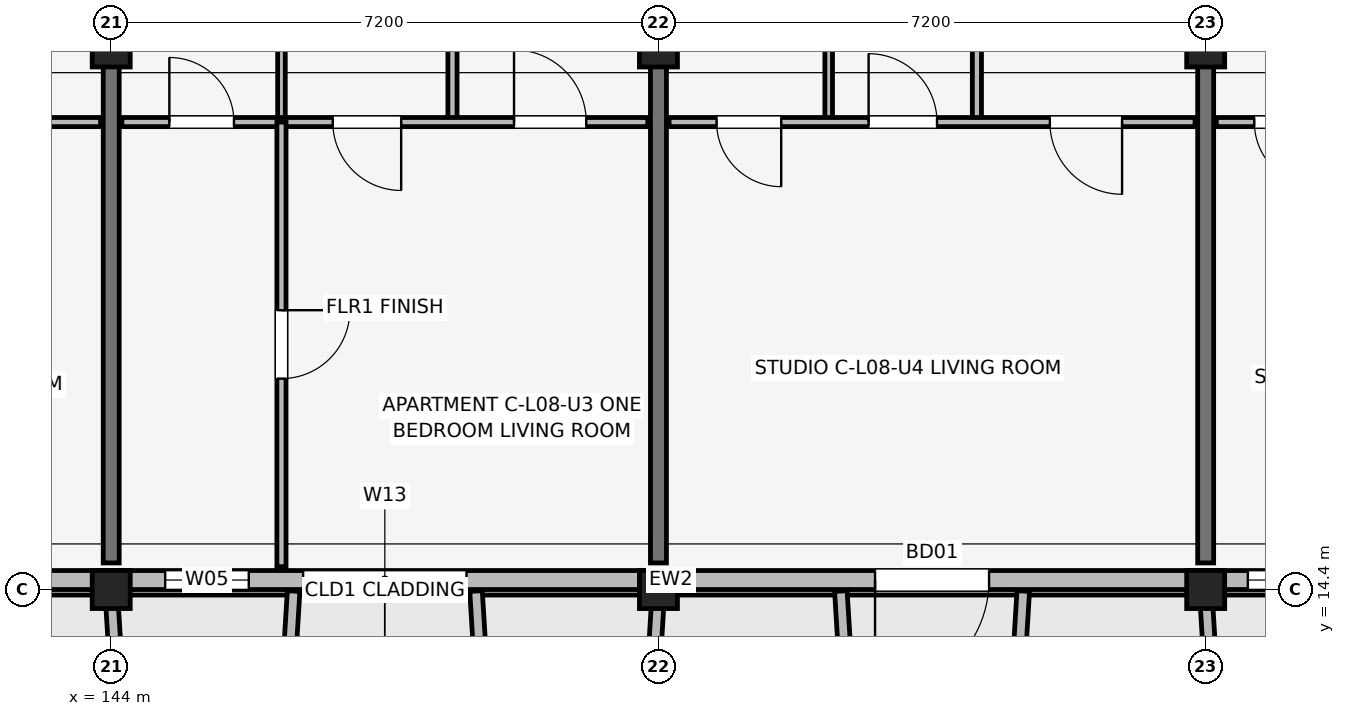
"""IFC4 building model, lengths in metres.
Left out: names, types, materials, properties, quantities, classifications, styles, units other than length and angle.
Written with IfcOpenShell. Run it as: python <this file> out.ifc"""

import sys

from ifc_helpers import new_model, si_unit, direction, frame, frame_2d, origin, origin_2d, place, context, subcontext, project, spatial, rectangle, extrude, element, fill, save


model = new_model("IFC4")
c1 = context("Model", 3, precision=1e-05, world=origin(), true_north=direction((0.0, 1.0)))
c2 = subcontext(c1, "Body", "Model", "MODEL_VIEW")
j1 = project(units=[si_unit("LENGTHUNIT", "METRE"), si_unit("PLANEANGLEUNIT", "RADIAN")], contexts=[c1])
p1 = place(None, origin())
s1 = spatial("IfcSite", under=j1, at=p1, CompositionType="ELEMENT")
p2 = place(p1, origin())
s2 = spatial("IfcBuilding", under=s1, at=p2, CompositionType="ELEMENT")
p3 = place(p2, frame((0.0, 0.0, 27.6)))
s3 = spatial("IfcBuildingStorey", under=s2, at=p3, CompositionType="ELEMENT", Elevation=27.6)
p4 = place(p3, frame((144.0, 14.4, 0.0), z_axis=(0.0, 0.0, 1.0), x_axis=(1.0, 0.0, 0.0)))
e1 = element("IfcColumn", 1, at=p4, inside=s3, PredefinedType="COLUMN", context=c2, shape_type="SweptSolid", body=[
    extrude(rectangle(XDim=0.5, YDim=0.5, at=origin_2d()), origin(), (0.0, 0.0, 1.0), 3.15),
])
p5 = place(p3, frame((144.0, 21.6, 0.0), z_axis=(0.0, 0.0, 1.0), x_axis=(1.0, 0.0, 0.0)))
e2 = element("IfcColumn", 2, at=p5, inside=s3, PredefinedType="COLUMN", context=c2, shape_type="SweptSolid", body=[
    extrude(rectangle(XDim=0.5, YDim=0.65, at=origin_2d()), origin(), (0.0, 0.0, 1.0), 3.15),
])
p6 = place(p3, frame((151.2, 14.4, 0.0), z_axis=(0.0, 0.0, 1.0), x_axis=(1.0, 0.0, 0.0)))
e3 = element("IfcColumn", 3, at=p6, inside=s3, PredefinedType="COLUMN", context=c2, shape_type="SweptSolid", body=[
    extrude(rectangle(XDim=0.5, YDim=0.5, at=origin_2d()), origin(), (0.0, 0.0, 1.0), 3.15),
])
p7 = place(p3, frame((151.2, 21.6, 0.0), z_axis=(0.0, 0.0, 1.0), x_axis=(1.0, 0.0, 0.0)))
e4 = element("IfcColumn", 4, at=p7, inside=s3, PredefinedType="COLUMN", context=c2, shape_type="SweptSolid", body=[
    extrude(rectangle(XDim=0.5, YDim=0.65, at=origin_2d()), origin(), (0.0, 0.0, 1.0), 3.15),
])
p8 = place(p3, frame((158.4, 14.4, 0.0), z_axis=(0.0, 0.0, 1.0), x_axis=(1.0, 0.0, 0.0)))
e5 = element("IfcColumn", 5, at=p8, inside=s3, PredefinedType="COLUMN", context=c2, shape_type="SweptSolid", body=[
    extrude(rectangle(XDim=0.5, YDim=0.5, at=origin_2d()), origin(), (0.0, 0.0, 1.0), 3.15),
])
p9 = place(p3, frame((158.4, 21.6, 0.0), z_axis=(0.0, 0.0, 1.0), x_axis=(1.0, 0.0, 0.0)))
e6 = element("IfcColumn", 6, at=p9, inside=s3, PredefinedType="COLUMN", context=c2, shape_type="SweptSolid", body=[
    extrude(rectangle(XDim=0.5, YDim=0.65, at=origin_2d()), origin(), (0.0, 0.0, 1.0), 3.15),
])
for number, where, z_axis, x_axis in (
    (7, (144.0, 14.75, 0.0), (0.0, 0.0, 1.0), (0.0, 1.0, 0.0)),
    (8, (151.2, 14.75, 0.0), (0.0, 0.0, 1.0), (0.0, 1.0, 0.0)),
    (9, (158.4, 14.75, 0.0), (0.0, 0.0, 1.0), (0.0, 1.0, 0.0)),
):
    element("IfcWall", number, at=place(p3, frame(where, z_axis=z_axis, x_axis=x_axis)), inside=s3, PredefinedType="SHEAR", context=c2, shape_type="SweptSolid", body=[
        extrude(rectangle(XDim=9.4, YDim=0.21, at=frame_2d((4.7, 0.0))), origin(), (0.0, 0.0, 1.0), 3.15),
    ])
p10 = place(p3, frame((132.6, 14.525, 0.0), z_axis=(0.0, 0.0, 1.0), x_axis=(1.0, 0.0, 0.0)))
e10 = element("IfcWall", 10, at=p10, inside=s3, PredefinedType="SOLIDWALL", context=c2, shape_type="SweptSolid", body=[
    extrude(rectangle(XDim=30.0, YDim=0.25, at=frame_2d((15.0, 0.0))), origin(), (0.0, 0.0, 1.0), 2.43),
])
p11 = place(p10, frame((8.625, 0.0, 0.0), z_axis=(0.0, 0.0, 1.0), x_axis=(-1.0, 0.0, 0.0)))
e11 = element("IfcOpeningElement", 11, at=p11, cuts=e10, PredefinedType="OPENING", context=c2, shape_type="SweptSolid", body=[
    extrude(rectangle(XDim=1.65, YDim=2.15, at=frame_2d((0.825, 1.075))), frame((0.0, 0.135, 0.0), z_axis=(0.0, -1.0, 0.0), x_axis=(1.0, 0.0, 0.0)), (0.0, 0.0, 1.0), 0.27),
])
p12 = place(p10, frame((22.95, 0.0, 0.0), z_axis=(0.0, 0.0, 1.0), x_axis=(-1.0, 0.0, 0.0)))
e12 = element("IfcOpeningElement", 12, at=p12, cuts=e10, PredefinedType="OPENING", context=c2, shape_type="SweptSolid", body=[
    extrude(rectangle(XDim=1.5, YDim=2.15, at=frame_2d((0.75, 1.075))), frame((0.0, 0.135, 0.0), z_axis=(0.0, -1.0, 0.0), x_axis=(1.0, 0.0, 0.0)), (0.0, 0.0, 1.0), 0.27),
])
p13 = place(p10, frame((2.365, 0.0, 0.75)))
e13 = element("IfcOpeningElement", 13, at=p13, cuts=e10, PredefinedType="OPENING", context=c2, shape_type="SweptSolid", body=[
    extrude(rectangle(XDim=0.98, YDim=1.45, at=frame_2d((0.49, 0.725))), frame((0.0, 0.135, 0.0), z_axis=(0.0, -1.0, 0.0), x_axis=(1.0, 0.0, 0.0)), (0.0, 0.0, 1.0), 0.27),
])
p14 = place(p10, frame((12.11, 0.0, 0.75)))
e14 = element("IfcOpeningElement", 14, at=p14, cuts=e10, PredefinedType="OPENING", context=c2, shape_type="SweptSolid", body=[
    extrude(rectangle(XDim=1.1, YDim=1.5, at=frame_2d((0.55, 0.75))), frame((0.0, 0.135, 0.0), z_axis=(0.0, -1.0, 0.0), x_axis=(1.0, 0.0, 0.0)), (0.0, 0.0, 1.0), 0.27),
])
p15 = place(p10, frame((13.925, 0.0, 0.67)))
e15 = element("IfcOpeningElement", 15, at=p15, cuts=e10, PredefinedType="OPENING", context=c2, shape_type="SweptSolid", body=[
    extrude(rectangle(XDim=2.15, YDim=1.65, at=frame_2d((1.075, 0.825))), frame((0.0, 0.135, 0.0), z_axis=(0.0, -1.0, 0.0), x_axis=(1.0, 0.0, 0.0)), (0.0, 0.0, 1.0), 0.27),
])
p16 = place(p10, frame((26.355, 0.0, 0.7)))
e16 = element("IfcOpeningElement", 16, at=p16, cuts=e10, PredefinedType="OPENING", context=c2, shape_type="SweptSolid", body=[
    extrude(rectangle(XDim=1.58, YDim=1.6, at=frame_2d((0.79, 0.8))), frame((0.0, 0.135, 0.0), z_axis=(0.0, -1.0, 0.0), x_axis=(1.0, 0.0, 0.0)), (0.0, 0.0, 1.0), 0.27),
])
p17 = place(p3, frame((144.0, 14.38, 0.0), z_axis=(0.0, 0.0, 1.0), x_axis=(0.061170732449, -0.998127317276, 0.0)))
e17 = element("IfcWall", 17, at=p17, inside=s3, PredefinedType="ELEMENTEDWALL", context=c2, shape_type="SweptSolid", body=[
    extrude(rectangle(XDim=1.964, YDim=0.165, at=frame_2d((0.982, 0.0))), origin(), (0.0, 0.0, 1.0), 2.95),
])
for number, where, z_axis, x_axis in (
    (18, (146.4, 14.38, 0.0), (0.0, 0.0, 1.0), (-0.061, -0.998, 0.0)),
    (19, (148.8, 14.38, 0.0), (0.0, 0.0, 1.0), (0.061, -0.998, 0.0)),
):
    element("IfcWall", number, at=place(p3, frame(where, z_axis=z_axis, x_axis=x_axis)), inside=s3, PredefinedType="ELEMENTEDWALL", context=c2, shape_type="SweptSolid", body=[
        extrude(rectangle(XDim=1.964, YDim=0.165, at=frame_2d((0.982, 0.0))), origin(), (0.0, 0.0, 1.0), 2.53),
    ])
p18 = place(p3, frame((151.2, 14.38, 0.0), z_axis=(0.0, 0.0, 1.0), x_axis=(-0.061046865508, -0.998134900808, 0.0)))
e20 = element("IfcWall", 20, at=p18, inside=s3, PredefinedType="ELEMENTEDWALL", context=c2, shape_type="SweptSolid", body=[
    extrude(rectangle(XDim=1.964, YDim=0.165, at=frame_2d((0.982, 0.0))), origin(), (0.0, 0.0, 1.0), 2.95),
])
for number, where, z_axis, x_axis in (
    (21, (153.6, 14.38, 0.0), (0.0, 0.0, 1.0), (0.061, -0.998, 0.0)),
    (22, (156.0, 14.38, 0.0), (0.0, 0.0, 1.0), (-0.061, -0.998, 0.0)),
):
    element("IfcWall", number, at=place(p3, frame(where, z_axis=z_axis, x_axis=x_axis)), inside=s3, PredefinedType="ELEMENTEDWALL", context=c2, shape_type="SweptSolid", body=[
        extrude(rectangle(XDim=1.964, YDim=0.165, at=frame_2d((0.982, 0.0))), origin(), (0.0, 0.0, 1.0), 2.55),
    ])
p19 = place(p3, frame((158.4, 14.38, 0.0), z_axis=(0.0, 0.0, 1.0), x_axis=(0.061170732449, -0.998127317276, 0.0)))
e23 = element("IfcWall", 23, at=p19, inside=s3, PredefinedType="ELEMENTEDWALL", context=c2, shape_type="SweptSolid", body=[
    extrude(rectangle(XDim=1.964, YDim=0.165, at=frame_2d((0.982, 0.0))), origin(), (0.0, 0.0, 1.0), 2.95),
])
p20 = place(p3, frame((136.94, 20.55, 0.0), z_axis=(0.0, 0.0, 1.0), x_axis=(1.0, 0.0, 0.0)))
e24 = element("IfcWall", 24, at=p20, inside=s3, PredefinedType="PARTITIONING", context=c2, shape_type="SweptSolid", body=[
    extrude(rectangle(XDim=6.92, YDim=0.12, at=frame_2d((3.46, 0.0))), origin(), (0.0, 0.0, 1.0), 2.38),
])
p21 = place(p20, frame((0.625, 0.0, 0.0)))
e25 = element("IfcOpeningElement", 25, at=p21, cuts=e24, PredefinedType="OPENING", context=c2, shape_type="SweptSolid", body=[
    extrude(rectangle(XDim=0.85, YDim=2.08, at=frame_2d((0.425, 1.04))), frame((0.0, 0.07, 0.0), z_axis=(0.0, -1.0, 0.0), x_axis=(1.0, 0.0, 0.0)), (0.0, 0.0, 1.0), 0.14),
])
p22 = place(p20, frame((3.525, 0.0, 0.0), z_axis=(0.0, 0.0, 1.0), x_axis=(-1.0, 0.0, 0.0)))
e26 = element("IfcOpeningElement", 26, at=p22, cuts=e24, PredefinedType="OPENING", context=c2, shape_type="SweptSolid", body=[
    extrude(rectangle(XDim=0.9, YDim=2.08, at=frame_2d((0.45, 1.04))), frame((0.0, 0.07, 0.0), z_axis=(0.0, -1.0, 0.0), x_axis=(1.0, 0.0, 0.0)), (0.0, 0.0, 1.0), 0.14),
])
p23 = place(p20, frame((5.01, 0.0, 0.0)))
e27 = element("IfcOpeningElement", 27, at=p23, cuts=e24, PredefinedType="OPENING", context=c2, shape_type="SweptSolid", body=[
    extrude(rectangle(XDim=0.95, YDim=2.08, at=frame_2d((0.475, 1.04))), frame((0.0, 0.07, 0.0), z_axis=(0.0, -1.0, 0.0), x_axis=(1.0, 0.0, 0.0)), (0.0, 0.0, 1.0), 0.14),
])
p24 = place(p3, frame((146.24, 20.55, 0.0), z_axis=(0.0, 0.0, 1.0), x_axis=(0.0, 1.0, 0.0)))
e28 = element("IfcWall", 28, at=p24, inside=s3, PredefinedType="PARTITIONING", context=c2, shape_type="SweptSolid", body=[
    extrude(rectangle(XDim=3.75, YDim=0.1, at=frame_2d((1.875, 0.0))), origin(), (0.0, 0.0, 1.0), 2.38),
])
p25 = place(p3, frame((148.49, 20.55, 0.0), z_axis=(0.0, 0.0, 1.0), x_axis=(0.0, 1.0, 0.0)))
e29 = element("IfcWall", 29, at=p25, inside=s3, PredefinedType="PARTITIONING", context=c2, shape_type="SweptSolid", body=[
    extrude(rectangle(XDim=3.75, YDim=0.12, at=frame_2d((1.875, 0.0))), origin(), (0.0, 0.0, 1.0), 2.38),
])
p26 = place(p3, frame((144.14, 20.55, 0.0), z_axis=(0.0, 0.0, 1.0), x_axis=(1.0, 0.0, 0.0)))
e30 = element("IfcWall", 30, at=p26, inside=s3, PredefinedType="PARTITIONING", context=c2, shape_type="SweptSolid", body=[
    extrude(rectangle(XDim=6.92, YDim=0.12, at=frame_2d((3.46, 0.0))), origin(), (0.0, 0.0, 1.0), 2.38),
])
p27 = place(p26, frame((0.625, 0.0, 0.0)))
e31 = element("IfcOpeningElement", 31, at=p27, cuts=e30, PredefinedType="OPENING", context=c2, shape_type="SweptSolid", body=[
    extrude(rectangle(XDim=0.85, YDim=2.08, at=frame_2d((0.425, 1.04))), frame((0.0, 0.07, 0.0), z_axis=(0.0, -1.0, 0.0), x_axis=(1.0, 0.0, 0.0)), (0.0, 0.0, 1.0), 0.14),
])
p28 = place(p26, frame((3.675, 0.0, 0.0), z_axis=(0.0, 0.0, 1.0), x_axis=(-1.0, 0.0, 0.0)))
e32 = element("IfcOpeningElement", 32, at=p28, cuts=e30, PredefinedType="OPENING", context=c2, shape_type="SweptSolid", body=[
    extrude(rectangle(XDim=0.9, YDim=2.08, at=frame_2d((0.45, 1.04))), frame((0.0, 0.07, 0.0), z_axis=(0.0, -1.0, 0.0), x_axis=(1.0, 0.0, 0.0)), (0.0, 0.0, 1.0), 0.14),
])
p29 = place(p26, frame((5.16, 0.0, 0.0)))
e33 = element("IfcOpeningElement", 33, at=p29, cuts=e30, PredefinedType="OPENING", context=c2, shape_type="SweptSolid", body=[
    extrude(rectangle(XDim=0.95, YDim=2.08, at=frame_2d((0.475, 1.04))), frame((0.0, 0.07, 0.0), z_axis=(0.0, -1.0, 0.0), x_axis=(1.0, 0.0, 0.0)), (0.0, 0.0, 1.0), 0.14),
])
p30 = place(p3, frame((146.24, 14.7, 0.0), z_axis=(0.0, 0.0, 1.0), x_axis=(0.0, 1.0, 0.0)))
e34 = element("IfcWall", 34, at=p30, inside=s3, PredefinedType="PARTITIONING", context=c2, shape_type="SweptSolid", body=[
    extrude(rectangle(XDim=5.85, YDim=0.12, at=frame_2d((2.925, 0.0))), origin(), (0.0, 0.0, 1.0), 2.38),
])
p31 = place(p30, frame((3.375, 0.0, 0.0), z_axis=(0.0, 0.0, 1.0), x_axis=(-1.0, 0.0, 0.0)))
e35 = element("IfcOpeningElement", 35, at=p31, cuts=e34, PredefinedType="OPENING", context=c2, shape_type="SweptSolid", body=[
    extrude(rectangle(XDim=0.9, YDim=2.08, at=frame_2d((0.45, 1.04))), frame((0.0, 0.07, 0.0), z_axis=(0.0, -1.0, 0.0), x_axis=(1.0, 0.0, 0.0)), (0.0, 0.0, 1.0), 0.14),
])
p32 = place(p3, frame((153.44, 20.55, 0.0), z_axis=(0.0, 0.0, 1.0), x_axis=(0.0, 1.0, 0.0)))
e36 = element("IfcWall", 36, at=p32, inside=s3, PredefinedType="PARTITIONING", context=c2, shape_type="SweptSolid", body=[
    extrude(rectangle(XDim=3.75, YDim=0.1, at=frame_2d((1.875, 0.0))), origin(), (0.0, 0.0, 1.0), 2.38),
])
p33 = place(p3, frame((155.39, 20.55, 0.0), z_axis=(0.0, 0.0, 1.0), x_axis=(0.0, 1.0, 0.0)))
e37 = element("IfcWall", 37, at=p33, inside=s3, PredefinedType="PARTITIONING", context=c2, shape_type="SweptSolid", body=[
    extrude(rectangle(XDim=3.75, YDim=0.12, at=frame_2d((1.875, 0.0))), origin(), (0.0, 0.0, 1.0), 2.38),
])
p34 = place(p3, frame((151.34, 20.55, 0.0), z_axis=(0.0, 0.0, 1.0), x_axis=(1.0, 0.0, 0.0)))
e38 = element("IfcWall", 38, at=p34, inside=s3, PredefinedType="PARTITIONING", context=c2, shape_type="SweptSolid", body=[
    extrude(rectangle(XDim=6.92, YDim=0.12, at=frame_2d((3.46, 0.0))), origin(), (0.0, 0.0, 1.0), 2.38),
])
p35 = place(p34, frame((1.475, 0.0, 0.0), z_axis=(0.0, 0.0, 1.0), x_axis=(-1.0, 0.0, 0.0)))
e39 = element("IfcOpeningElement", 39, at=p35, cuts=e38, PredefinedType="OPENING", context=c2, shape_type="SweptSolid", body=[
    extrude(rectangle(XDim=0.85, YDim=2.08, at=frame_2d((0.425, 1.04))), frame((0.0, 0.07, 0.0), z_axis=(0.0, -1.0, 0.0), x_axis=(1.0, 0.0, 0.0)), (0.0, 0.0, 1.0), 0.14),
])
p36 = place(p34, frame((2.625, 0.0, 0.0)))
e40 = element("IfcOpeningElement", 40, at=p36, cuts=e38, PredefinedType="OPENING", context=c2, shape_type="SweptSolid", body=[
    extrude(rectangle(XDim=0.9, YDim=2.08, at=frame_2d((0.45, 1.04))), frame((0.0, 0.07, 0.0), z_axis=(0.0, -1.0, 0.0), x_axis=(1.0, 0.0, 0.0)), (0.0, 0.0, 1.0), 0.14),
])
p37 = place(p34, frame((5.96, 0.0, 0.0), z_axis=(0.0, 0.0, 1.0), x_axis=(-1.0, 0.0, 0.0)))
e41 = element("IfcOpeningElement", 41, at=p37, cuts=e38, PredefinedType="OPENING", context=c2, shape_type="SweptSolid", body=[
    extrude(rectangle(XDim=0.95, YDim=2.08, at=frame_2d((0.475, 1.04))), frame((0.0, 0.07, 0.0), z_axis=(0.0, -1.0, 0.0), x_axis=(1.0, 0.0, 0.0)), (0.0, 0.0, 1.0), 0.14),
])
p38 = place(p3, frame((158.54, 20.55, 0.0), z_axis=(0.0, 0.0, 1.0), x_axis=(1.0, 0.0, 0.0)))
e42 = element("IfcWall", 42, at=p38, inside=s3, PredefinedType="PARTITIONING", context=c2, shape_type="SweptSolid", body=[
    extrude(rectangle(XDim=6.92, YDim=0.12, at=frame_2d((3.46, 0.0))), origin(), (0.0, 0.0, 1.0), 2.38),
])
p39 = place(p38, frame((1.35, 0.0, 0.0), z_axis=(0.0, 0.0, 1.0), x_axis=(-1.0, 0.0, 0.0)))
e43 = element("IfcOpeningElement", 43, at=p39, cuts=e42, PredefinedType="OPENING", context=c2, shape_type="SweptSolid", body=[
    extrude(rectangle(XDim=0.85, YDim=2.08, at=frame_2d((0.425, 1.04))), frame((0.0, 0.07, 0.0), z_axis=(0.0, -1.0, 0.0), x_axis=(1.0, 0.0, 0.0)), (0.0, 0.0, 1.0), 0.14),
])
p40 = place(p38, frame((2.255, 0.0, 0.0)))
e44 = element("IfcOpeningElement", 44, at=p40, cuts=e42, PredefinedType="OPENING", context=c2, shape_type="SweptSolid", body=[
    extrude(rectangle(XDim=0.9, YDim=2.08, at=frame_2d((0.45, 1.04))), frame((0.0, 0.07, 0.0), z_axis=(0.0, -1.0, 0.0), x_axis=(1.0, 0.0, 0.0)), (0.0, 0.0, 1.0), 0.14),
])
p41 = place(p38, frame((4.86, 0.0, 0.0), z_axis=(0.0, 0.0, 1.0), x_axis=(-1.0, 0.0, 0.0)))
e45 = element("IfcOpeningElement", 45, at=p41, cuts=e42, PredefinedType="OPENING", context=c2, shape_type="SweptSolid", body=[
    extrude(rectangle(XDim=0.95, YDim=2.08, at=frame_2d((0.475, 1.04))), frame((0.0, 0.07, 0.0), z_axis=(0.0, -1.0, 0.0), x_axis=(1.0, 0.0, 0.0)), (0.0, 0.0, 1.0), 0.14),
])
p42 = place(p12, origin())
e46 = element("IfcDoor", 46, at=p42, inside=s3, OperationType="SINGLE_SWING_LEFT", PredefinedType="DOOR", context=c2, shape_type="SweptSolid", body=[
    extrude(rectangle(XDim=1.5, YDim=2.15, at=frame_2d((0.75, 1.075))), frame((0.0, 0.025, 0.0), z_axis=(0.0, -1.0, 0.0), x_axis=(1.0, 0.0, 0.0)), (0.0, 0.0, 1.0), 0.05),
])
fill(e12, e46)
p43 = place(p14, origin())
e47 = element("IfcWindow", 47, at=p43, inside=s3, PartitioningType="SINGLE_PANEL", PredefinedType="WINDOW", context=c2, shape_type="SweptSolid", body=[
    extrude(rectangle(XDim=1.1, YDim=1.5, at=frame_2d((0.55, 0.75))), frame((0.0, 0.03, 0.0), z_axis=(0.0, -1.0, 0.0), x_axis=(1.0, 0.0, 0.0)), (0.0, 0.0, 1.0), 0.06),
])
fill(e14, e47)
p44 = place(p15, origin())
e48 = element("IfcWindow", 48, at=p44, inside=s3, PartitioningType="SINGLE_PANEL", PredefinedType="WINDOW", context=c2, shape_type="SweptSolid", body=[
    extrude(rectangle(XDim=2.15, YDim=1.65, at=frame_2d((1.075, 0.825))), frame((0.0, 0.03, 0.0), z_axis=(0.0, -1.0, 0.0), x_axis=(1.0, 0.0, 0.0)), (0.0, 0.0, 1.0), 0.06),
])
fill(e15, e48)
p45 = place(p16, origin())
e49 = element("IfcWindow", 49, at=p45, inside=s3, PartitioningType="SINGLE_PANEL", PredefinedType="WINDOW", context=c2, shape_type="SweptSolid", body=[
    extrude(rectangle(XDim=1.58, YDim=1.6, at=frame_2d((0.79, 0.8))), frame((0.0, 0.03, 0.0), z_axis=(0.0, -1.0, 0.0), x_axis=(1.0, 0.0, 0.0)), (0.0, 0.0, 1.0), 0.06),
])
fill(e16, e49)
p46 = place(p27, origin())
e50 = element("IfcDoor", 50, at=p46, inside=s3, OperationType="SINGLE_SWING_LEFT", PredefinedType="DOOR", context=c2, shape_type="SweptSolid", body=[
    extrude(rectangle(XDim=0.85, YDim=2.08, at=frame_2d((0.425, 1.04))), frame((0.0, 0.025, 0.0), z_axis=(0.0, -1.0, 0.0), x_axis=(1.0, 0.0, 0.0)), (0.0, 0.0, 1.0), 0.05),
])
fill(e31, e50)
p47 = place(p28, origin())
e51 = element("IfcDoor", 51, at=p47, inside=s3, OperationType="SINGLE_SWING_RIGHT", PredefinedType="DOOR", context=c2, shape_type="SweptSolid", body=[
    extrude(rectangle(XDim=0.9, YDim=2.08, at=frame_2d((0.45, 1.04))), frame((0.0, 0.025, 0.0), z_axis=(0.0, -1.0, 0.0), x_axis=(1.0, 0.0, 0.0)), (0.0, 0.0, 1.0), 0.05),
])
fill(e32, e51)
p48 = place(p29, origin())
e52 = element("IfcDoor", 52, at=p48, inside=s3, OperationType="SINGLE_SWING_LEFT", PredefinedType="DOOR", context=c2, shape_type="SweptSolid", body=[
    extrude(rectangle(XDim=0.95, YDim=2.08, at=frame_2d((0.475, 1.04))), frame((0.0, 0.025, 0.0), z_axis=(0.0, -1.0, 0.0), x_axis=(1.0, 0.0, 0.0)), (0.0, 0.0, 1.0), 0.05),
])
fill(e33, e52)
p49 = place(p31, origin())
e53 = element("IfcDoor", 53, at=p49, inside=s3, OperationType="SINGLE_SWING_RIGHT", PredefinedType="DOOR", context=c2, shape_type="SweptSolid", body=[
    extrude(rectangle(XDim=0.9, YDim=2.08, at=frame_2d((0.45, 1.04))), frame((0.0, 0.025, 0.0), z_axis=(0.0, -1.0, 0.0), x_axis=(1.0, 0.0, 0.0)), (0.0, 0.0, 1.0), 0.05),
])
fill(e35, e53)
p50 = place(p35, origin())
e54 = element("IfcDoor", 54, at=p50, inside=s3, OperationType="SINGLE_SWING_RIGHT", PredefinedType="DOOR", context=c2, shape_type="SweptSolid", body=[
    extrude(rectangle(XDim=0.85, YDim=2.08, at=frame_2d((0.425, 1.04))), frame((0.0, 0.025, 0.0), z_axis=(0.0, -1.0, 0.0), x_axis=(1.0, 0.0, 0.0)), (0.0, 0.0, 1.0), 0.05),
])
fill(e39, e54)
p51 = place(p36, origin())
e55 = element("IfcDoor", 55, at=p51, inside=s3, OperationType="SINGLE_SWING_LEFT", PredefinedType="DOOR", context=c2, shape_type="SweptSolid", body=[
    extrude(rectangle(XDim=0.9, YDim=2.08, at=frame_2d((0.45, 1.04))), frame((0.0, 0.025, 0.0), z_axis=(0.0, -1.0, 0.0), x_axis=(1.0, 0.0, 0.0)), (0.0, 0.0, 1.0), 0.05),
])
fill(e40, e55)
p52 = place(p37, origin())
e56 = element("IfcDoor", 56, at=p52, inside=s3, OperationType="SINGLE_SWING_RIGHT", PredefinedType="DOOR", context=c2, shape_type="SweptSolid", body=[
    extrude(rectangle(XDim=0.95, YDim=2.08, at=frame_2d((0.475, 1.04))), frame((0.0, 0.025, 0.0), z_axis=(0.0, -1.0, 0.0), x_axis=(1.0, 0.0, 0.0)), (0.0, 0.0, 1.0), 0.05),
])
fill(e41, e56)
p53 = place(p39, origin())
e57 = element("IfcDoor", 57, at=p53, inside=s3, OperationType="SINGLE_SWING_RIGHT", PredefinedType="DOOR", context=c2, shape_type="SweptSolid", body=[
    extrude(rectangle(XDim=0.85, YDim=2.08, at=frame_2d((0.425, 1.04))), frame((0.0, 0.025, 0.0), z_axis=(0.0, -1.0, 0.0), x_axis=(1.0, 0.0, 0.0)), (0.0, 0.0, 1.0), 0.05),
])
fill(e43, e57)
save(model, sys.argv[1])
